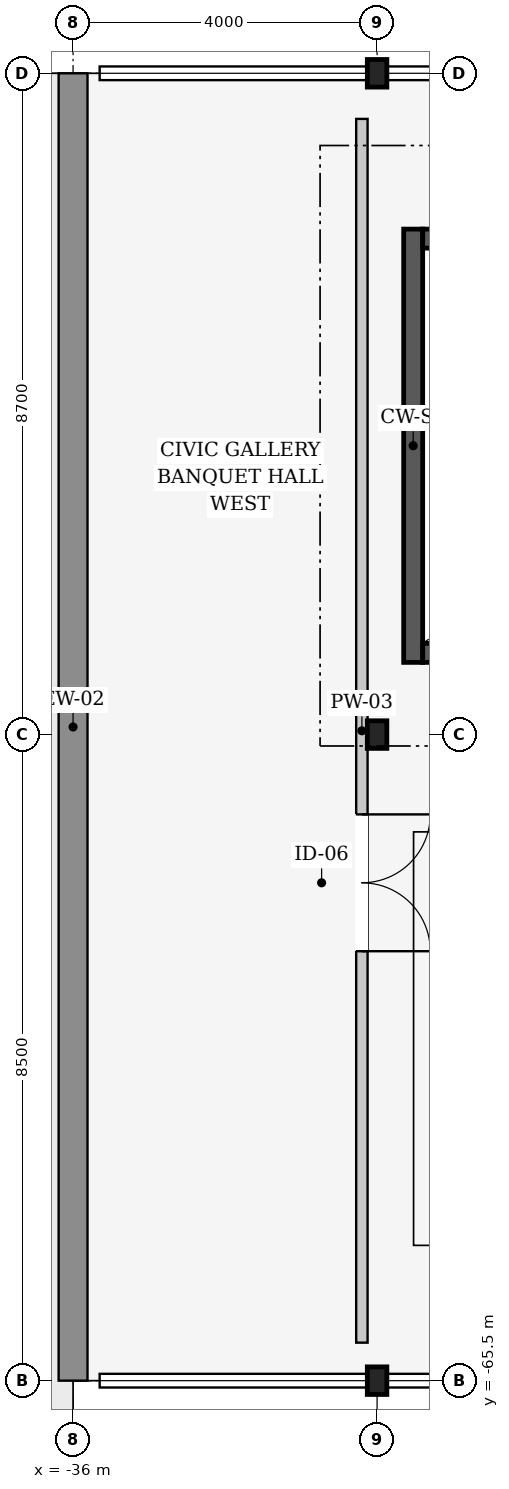
"""IFC4 building model, lengths in metres.
Left out: names, types, materials, properties, quantities, classifications, styles, units other than length and angle.
Written with IfcOpenShell. Run it as: python <this file> out.ifc"""

import sys

from ifc_helpers import new_model, si_unit, direction, frame, frame_2d, origin, origin_2d, place, context, subcontext, project, spatial, rectangle, i_section, extrude, element, fill, save


model = new_model("IFC4")
c1 = context("Model", 3, precision=1e-05, world=origin(), true_north=direction((0.0, 1.0)))
c2 = subcontext(c1, "Body", "Model", "MODEL_VIEW")
j1 = project(units=[si_unit("LENGTHUNIT", "METRE"), si_unit("PLANEANGLEUNIT", "RADIAN")], contexts=[c1])
p1 = place(None, origin())
s1 = spatial("IfcSite", under=j1, at=p1, CompositionType="ELEMENT")
p2 = place(p1, origin())
s2 = spatial("IfcBuilding", under=s1, at=p2, CompositionType="ELEMENT")
p3 = place(p2, frame((0.0, 0.0, 16.2)))
s3 = spatial("IfcBuildingStorey", under=s2, at=p3, CompositionType="ELEMENT", Elevation=16.2)
for number, where, z_axis, x_axis in (
    (1, (-32.0, -65.5, 0.0), (0.0, 0.0, 1.0), (1.0, 0.0, 0.0)),
    (2, (-32.0, -57.0, 0.0), (0.0, 0.0, 1.0), (1.0, 0.0, 0.0)),
    (3, (-32.0, -48.3, 0.0), (0.0, 0.0, 1.0), (1.0, 0.0, 0.0)),
):
    element("IfcColumn", number, at=place(p3, frame(where, z_axis=z_axis, x_axis=x_axis)), inside=s3, PredefinedType="COLUMN", context=c2, shape_type="SweptSolid", body=[
        extrude(i_section(OverallWidth=0.257, OverallDepth=0.363, WebThickness=0.013, FlangeThickness=0.022, at=origin_2d()), origin(), (0.0, 0.0, 1.0), 4.8),
    ])
p4 = place(p3, frame((-36.0, -65.5, 0.0), z_axis=(0.0, 0.0, 1.0), x_axis=(0.0, 1.0, 0.0)))
e4 = element("IfcWall", 4, at=p4, inside=s3, PredefinedType="SOLIDWALL", context=c2, shape_type="SweptSolid", body=[
    extrude(rectangle(XDim=17.2, YDim=0.38, at=frame_2d((8.6, 0.0))), origin(), (0.0, 0.0, 1.0), 5.8),
])
p5 = place(p3, frame((-31.525, -56.05, 0.0), z_axis=(0.0, 0.0, 1.0), x_axis=(0.0, 1.0, 0.0)))
e5 = element("IfcWall", 5, at=p5, inside=s3, PredefinedType="SHEAR", context=c2, shape_type="SweptSolid", body=[
    extrude(rectangle(XDim=5.7, YDim=0.25, at=frame_2d((2.85, 0.0))), origin(), (0.0, 0.0, 1.0), 3.6),
])
for number, where, z_axis, x_axis in (
    (6, (-31.4, -50.475, 0.0), (0.0, 0.0, 1.0), (1.0, 0.0, 0.0)),
    (7, (-21.2, -55.925, 0.0), (0.0, 0.0, 1.0), (-1.0, 0.0, 0.0)),
):
    element("IfcWall", number, at=place(p3, frame(where, z_axis=z_axis, x_axis=x_axis)), inside=s3, PredefinedType="SHEAR", context=c2, shape_type="SweptSolid", body=[
        extrude(rectangle(XDim=10.2, YDim=0.25, at=frame_2d((5.1, 0.0))), origin(), (0.0, 0.0, 1.0), 3.6),
    ])
p6 = place(p3, frame((-32.2, -48.9, 0.0), z_axis=(0.0, 0.0, 1.0), x_axis=(0.0, -1.0, 0.0)))
e8 = element("IfcWall", 8, at=p6, inside=s3, PredefinedType="PARTITIONING", context=c2, shape_type="SweptSolid", body=[
    extrude(rectangle(XDim=16.1, YDim=0.15, at=frame_2d((8.05, 0.0))), origin(), (0.0, 0.0, 1.0), 3.605),
])
p7 = place(p6, frame((9.15, 0.0, 0.0)))
e9 = element("IfcOpeningElement", 9, at=p7, cuts=e8, PredefinedType="OPENING", context=c2, shape_type="SweptSolid", body=[
    extrude(rectangle(XDim=1.8, YDim=2.2, at=frame_2d((0.9, 1.1))), frame((0.0, 0.085, 0.0), z_axis=(0.0, -1.0, 0.0), x_axis=(1.0, 0.0, 0.0)), (0.0, 0.0, 1.0), 0.17),
])
p8 = place(p7, origin())
e10 = element("IfcDoor", 10, at=p8, inside=s3, OperationType="DOUBLE_DOOR_SINGLE_SWING", PredefinedType="DOOR", context=c2, shape_type="SweptSolid", body=[
    extrude(rectangle(XDim=1.8, YDim=2.2, at=frame_2d((0.9, 1.1))), frame((0.0, 0.025, 0.0), z_axis=(0.0, -1.0, 0.0), x_axis=(1.0, 0.0, 0.0)), (0.0, 0.0, 1.0), 0.05),
])
fill(e9, e10)
save(model, sys.argv[1])
